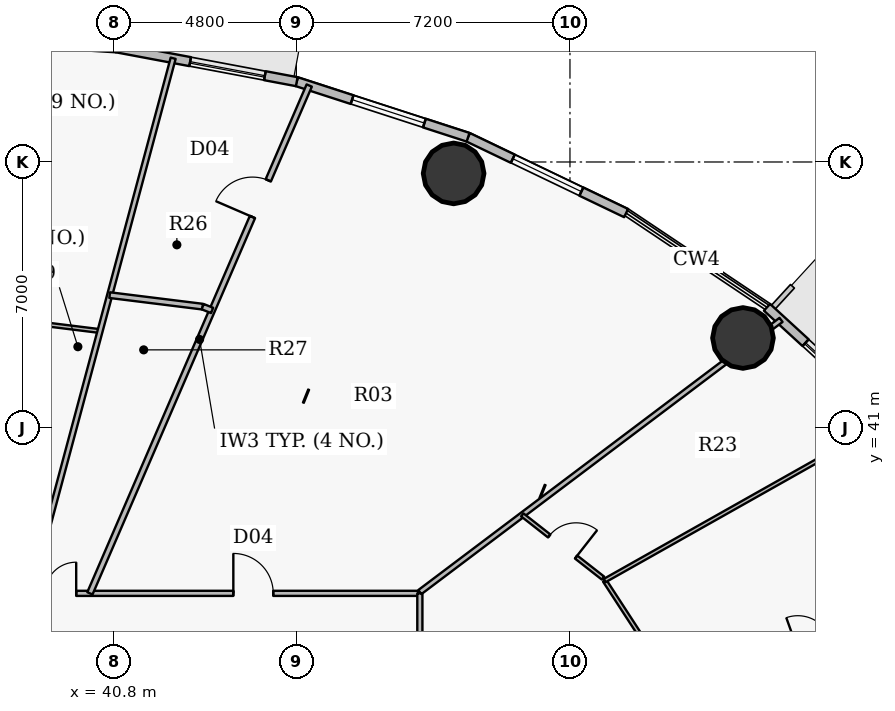
"""IFC4 building model, lengths in metres.
Left out: names, types, materials, properties, quantities, classifications, styles, units other than length and angle.
Written with IfcOpenShell. Run it as: python <this file> out.ifc"""

import sys

from ifc_helpers import new_model, si_unit, direction, frame, frame_2d, origin, origin_2d, place, context, subcontext, project, spatial, rectangle, hollow_circle, extrude, source, transform, mapped, element, fill, save


model = new_model("IFC4")
c1 = context("Model", 3, precision=1e-05, world=origin(), true_north=direction((0.0, 1.0)))
c2 = subcontext(c1, "Body", "Model", "MODEL_VIEW")
j1 = project(units=[si_unit("LENGTHUNIT", "METRE"), si_unit("PLANEANGLEUNIT", "RADIAN")], contexts=[c1])
p1 = place(None, origin())
s1 = spatial("IfcSite", under=j1, at=p1, CompositionType="ELEMENT")
p2 = place(p1, origin())
s2 = spatial("IfcBuilding", under=s1, at=p2, CompositionType="ELEMENT")
p3 = place(p2, frame((0.0, 0.0, 74.4)))
s3 = spatial("IfcBuildingStorey", under=s2, at=p3, CompositionType="ELEMENT", Elevation=74.4)
for number, where, z_axis, x_axis in (
    (1, (57.353, 43.369, 0.0), (0.0, 0.0, 1.0), (1.0, 0.0, 0.0)),
    (2, (49.738, 47.699, 0.0), (0.0, 0.0, 1.0), (1.0, 0.0, 0.0)),
):
    element("IfcColumn", number, at=place(p3, frame(where, z_axis=z_axis, x_axis=x_axis)), inside=s3, PredefinedType="COLUMN", context=c2, shape_type="SweptSolid", body=[
        extrude(hollow_circle(Radius=0.8, WallThickness=0.045, at=origin_2d()), origin(), (0.0, 0.0, 1.0), 4.2),
    ])
p4 = place(p3, frame((57.985, 44.176, 0.0), z_axis=(0.0, 0.0, 1.0), x_axis=(0.737116376281, -0.67576582321, 0.0)))
e3 = element("IfcWall", 3, at=p4, inside=s3, PredefinedType="SOLIDWALL", context=c2, shape_type="SweptSolid", body=[
    extrude(rectangle(XDim=4.294, YDim=0.24, at=frame_2d((2.147, 0.0))), origin(), (0.0, 0.0, 1.0), 3.95),
])
p5 = place(p4, frame((1.378, 0.0, 0.9)))
e4 = element("IfcOpeningElement", 4, at=p5, cuts=e3, PredefinedType="OPENING", context=c2, shape_type="SweptSolid", body=[
    extrude(rectangle(XDim=2.0, YDim=1.75, at=origin_2d()), frame((1.0, 0.13, 0.875), z_axis=(0.0, -1.0, 0.0), x_axis=(1.0, 0.0, 0.0)), (0.0, 0.0, 1.0), 0.26),
])
p6 = place(p3, frame((50.118, 48.651, 0.0), z_axis=(0.0, 0.0, 1.0), x_axis=(0.901601503137, -0.432567601123, 0.0)))
e5 = element("IfcWall", 5, at=p6, inside=s3, PredefinedType="SOLIDWALL", context=c2, shape_type="SweptSolid", body=[
    extrude(rectangle(XDim=4.613, YDim=0.24, at=frame_2d((2.306, 0.0))), origin(), (0.0, 0.0, 1.0), 3.95),
])
p7 = place(p6, frame((1.306, 0.0, 0.9)))
e6 = element("IfcOpeningElement", 6, at=p7, cuts=e5, PredefinedType="OPENING", context=c2, shape_type="SweptSolid", body=[
    extrude(rectangle(XDim=2.0, YDim=1.75, at=origin_2d()), frame((1.0, 0.13, 0.875), z_axis=(0.0, -1.0, 0.0), x_axis=(1.0, 0.0, 0.0)), (0.0, 0.0, 1.0), 0.26),
])
p8 = place(p3, frame((45.611, 50.113, 0.0), z_axis=(0.0, 0.0, 1.0), x_axis=(0.951207699013, -0.308551313946, 0.0)))
e7 = element("IfcWall", 7, at=p8, inside=s3, PredefinedType="SOLIDWALL", context=c2, shape_type="SweptSolid", body=[
    extrude(rectangle(XDim=4.739, YDim=0.24, at=frame_2d((2.369, 0.0))), origin(), (0.0, 0.0, 1.0), 3.95),
])
p9 = place(p8, frame((1.531, 0.0, 0.9)))
e8 = element("IfcOpeningElement", 8, at=p9, cuts=e7, PredefinedType="OPENING", context=c2, shape_type="SweptSolid", body=[
    extrude(rectangle(XDim=2.0, YDim=1.75, at=origin_2d()), frame((1.0, 0.13, 0.875), z_axis=(0.0, -1.0, 0.0), x_axis=(1.0, 0.0, 0.0)), (0.0, 0.0, 1.0), 0.26),
])
p10 = place(p3, frame((40.865, 51.005, 0.0), z_axis=(0.0, 0.0, 1.0), x_axis=(0.982791952378, -0.184715939598, 0.0)))
e9 = element("IfcWall", 9, at=p10, inside=s3, PredefinedType="SOLIDWALL", context=c2, shape_type="SweptSolid", body=[
    extrude(rectangle(XDim=4.828, YDim=0.24, at=frame_2d((2.414, 0.0))), origin(), (0.0, 0.0, 1.0), 3.95),
])
p11 = place(p10, frame((1.974, 0.0, 0.9)))
e10 = element("IfcOpeningElement", 10, at=p11, cuts=e9, PredefinedType="OPENING", context=c2, shape_type="SweptSolid", body=[
    extrude(rectangle(XDim=2.0, YDim=1.75, at=origin_2d()), frame((1.0, 0.13, 0.875), z_axis=(0.0, -1.0, 0.0), x_axis=(1.0, 0.0, 0.0)), (0.0, 0.0, 1.0), 0.26),
])
p12 = place(p3, frame((36.0, 51.305, 0.0), z_axis=(0.0, 0.0, 1.0), x_axis=(0.998106954071, -0.061502099433, 0.0)))
e11 = element("IfcWall", 11, at=p12, inside=s3, PredefinedType="SOLIDWALL", context=c2, shape_type="SweptSolid", body=[
    extrude(rectangle(XDim=4.875, YDim=0.24, at=frame_2d((2.438, 0.0))), origin(), (0.0, 0.0, 1.0), 3.95),
])
p13 = place(p12, frame((1.437, 0.0, 0.9)))
e12 = element("IfcOpeningElement", 12, at=p13, cuts=e11, PredefinedType="OPENING", context=c2, shape_type="SweptSolid", body=[
    extrude(rectangle(XDim=2.0, YDim=1.75, at=origin_2d()), frame((1.0, 0.13, 0.875), z_axis=(0.0, -1.0, 0.0), x_axis=(1.0, 0.0, 0.0)), (0.0, 0.0, 1.0), 0.26),
])
p14 = place(p3, frame((36.0, 44.101, 0.0), z_axis=(0.0, 0.0, 1.0), x_axis=(0.992395933878, -0.123086597249, 0.0)))
e13 = element("IfcWall", 13, at=p14, inside=s3, PredefinedType="PARTITIONING", context=c2, shape_type="SweptSolid", body=[
    extrude(rectangle(XDim=4.469, YDim=0.1, at=frame_2d((2.234, 0.0))), origin(), (0.0, 0.0, 1.0), 3.285),
])
p15 = place(p3, frame((38.586, 36.65, 0.0), z_axis=(0.0, 0.0, 1.0), x_axis=(1.0, 0.0, 0.0)))
e14 = element("IfcWall", 14, at=p15, inside=s3, PredefinedType="PARTITIONING", context=c2, shape_type="SweptSolid", body=[
    extrude(rectangle(XDim=10.22, YDim=0.135, at=frame_2d((5.11, 0.0))), origin(), (0.0, 0.0, 1.0), 3.285),
])
p16 = place(p15, frame((5.356, 0.0, 0.0)))
e15 = element("IfcOpeningElement", 15, at=p16, cuts=e14, PredefinedType="OPENING", context=c2, shape_type="SweptSolid", body=[
    extrude(rectangle(XDim=1.05, YDim=2.15, at=origin_2d()), frame((0.525, 0.078, 1.075), z_axis=(0.0, -1.0, 0.0), x_axis=(1.0, 0.0, 0.0)), (0.0, 0.0, 1.0), 0.155),
])
p17 = place(p15, frame((0.401, 0.0, 0.0)))
e16 = element("IfcOpeningElement", 16, at=p17, cuts=e14, PredefinedType="OPENING", context=c2, shape_type="SweptSolid", body=[
    extrude(rectangle(XDim=0.82, YDim=2.1, at=origin_2d()), frame((0.41, 0.078, 1.05), z_axis=(0.0, -1.0, 0.0), x_axis=(1.0, 0.0, 0.0)), (0.0, 0.0, 1.0), 0.155),
])
p18 = place(p3, frame((38.788, 37.404, 0.0), z_axis=(0.0, 0.0, 1.0), x_axis=(0.258823359021, 0.965924670368, 0.0)))
e17 = element("IfcWall", 17, at=p18, inside=s3, PredefinedType="PARTITIONING", context=c2, shape_type="SweptSolid", body=[
    extrude(rectangle(XDim=13.796, YDim=0.135, at=frame_2d((6.898, 0.0))), origin(), (0.0, 0.0, 1.0), 3.335),
])
p19 = place(p3, frame((40.168, 36.65, 0.0), z_axis=(0.0, 0.0, 1.0), x_axis=(0.396494814434, 0.918036961199, 0.0)))
e18 = element("IfcWall", 18, at=p19, inside=s3, PredefinedType="PARTITIONING", context=c2, shape_type="SweptSolid", body=[
    extrude(rectangle(XDim=14.555, YDim=0.15, at=frame_2d((7.277, 0.0))), origin(), (0.0, 0.0, 1.0), 3.335),
])
p20 = place(p19, frame((10.787, 0.0, 0.0)))
e19 = element("IfcOpeningElement", 19, at=p20, cuts=e18, PredefinedType="OPENING", context=c2, shape_type="SweptSolid", body=[
    extrude(rectangle(XDim=1.05, YDim=2.15, at=origin_2d()), frame((0.525, 0.085, 1.075), z_axis=(0.0, -1.0, 0.0), x_axis=(1.0, 0.0, 0.0)), (0.0, 0.0, 1.0), 0.17),
])
p21 = place(p3, frame((40.688, 44.497, 0.0), z_axis=(0.0, 0.0, 1.0), x_axis=(0.992393246318, -0.123108263989, 0.0)))
e20 = element("IfcWall", 20, at=p21, inside=s3, PredefinedType="PARTITIONING", context=c2, shape_type="SweptSolid", body=[
    extrude(rectangle(XDim=2.465, YDim=0.15, at=frame_2d((1.232, 0.0))), origin(), (0.0, 0.0, 1.0), 3.95),
])
p22 = place(p3, frame((43.135, 44.193, 0.0), z_axis=(0.0, 0.0, 1.0), x_axis=(0.928853768355, -0.370446591309, 0.0)))
e21 = element("IfcWall", 21, at=p22, inside=s3, PredefinedType="PARTITIONING", context=c2, shape_type="SweptSolid", body=[
    extrude(rectangle(XDim=0.268, YDim=0.15, at=frame_2d((0.134, 0.0))), origin(), (0.0, 0.0, 1.0), 3.95),
])
p23 = place(p3, frame((48.85, 27.538, 0.0), z_axis=(0.0, 0.0, 1.0), x_axis=(0.0, 1.0, 0.0)))
e22 = element("IfcWall", 22, at=p23, inside=s3, PredefinedType="PARTITIONING", context=c2, shape_type="SweptSolid", body=[
    extrude(rectangle(XDim=9.112, YDim=0.135, at=frame_2d((4.556, 0.0))), origin(), (0.0, 0.0, 1.0), 3.285),
])
p24 = place(p23, frame((4.056, 0.0, 0.0)))
e23 = element("IfcOpeningElement", 23, at=p24, cuts=e22, PredefinedType="OPENING", context=c2, shape_type="SweptSolid", body=[
    extrude(rectangle(XDim=1.0, YDim=2.15, at=origin_2d()), frame((0.5, 0.078, 1.075), z_axis=(0.0, -1.0, 0.0), x_axis=(1.0, 0.0, 0.0)), (0.0, 0.0, 1.0), 0.155),
])
p25 = place(p3, frame((48.85, 36.683, 0.0), z_axis=(0.0, 0.0, 1.0), x_axis=(0.798631551047, 0.601820276888, 0.0)))
e24 = element("IfcWall", 24, at=p25, inside=s3, PredefinedType="PARTITIONING", context=c2, shape_type="SweptSolid", body=[
    extrude(rectangle(XDim=11.9, YDim=0.135, at=frame_2d((5.95, 0.0))), origin(), (0.0, 0.0, 1.0), 3.285),
])
p26 = place(p3, frame((51.545, 38.714, 0.0), z_axis=(0.0, 0.0, 1.0), x_axis=(0.787378908715, -0.616469345637, 0.0)))
e25 = element("IfcWall", 25, at=p26, inside=s3, PredefinedType="PARTITIONING", context=c2, shape_type="SweptSolid", body=[
    extrude(rectangle(XDim=2.697, YDim=0.1, at=frame_2d((1.349, 0.0))), origin(), (0.0, 0.0, 1.0), 3.285),
])
p27 = place(p26, frame((0.898, 0.0, 0.0)))
e26 = element("IfcOpeningElement", 26, at=p27, cuts=e25, PredefinedType="OPENING", context=c2, shape_type="SweptSolid", body=[
    extrude(rectangle(XDim=0.9, YDim=2.1, at=origin_2d()), frame((0.45, 0.06, 1.05), z_axis=(0.0, -1.0, 0.0), x_axis=(1.0, 0.0, 0.0)), (0.0, 0.0, 1.0), 0.12),
])
p28 = place(p3, frame((53.712, 36.986, 0.0), z_axis=(0.0, 0.0, 1.0), x_axis=(0.545414193743, -0.838166664372, 0.0)))
e27 = element("IfcWall", 27, at=p28, inside=s3, PredefinedType="PARTITIONING", context=c2, shape_type="SweptSolid", body=[
    extrude(rectangle(XDim=3.526, YDim=0.1, at=frame_2d((1.763, 0.0))), origin(), (0.0, 0.0, 1.0), 3.95),
])
p29 = place(p3, frame((53.712, 36.986, 0.0), z_axis=(0.0, 0.0, 1.0), x_axis=(0.871096144904, 0.491112519016, 0.0)))
e28 = element("IfcWall", 28, at=p29, inside=s3, PredefinedType="PARTITIONING", context=c2, shape_type="SweptSolid", body=[
    extrude(rectangle(XDim=8.603, YDim=0.1, at=frame_2d((4.302, 0.0))), origin(), (0.0, 0.0, 1.0), 3.335),
])
p30 = place(p3, frame((55.635, 34.03, 0.0), z_axis=(0.0, 0.0, 1.0), x_axis=(0.941479076549, 0.337071429255, 0.0)))
e29 = element("IfcWall", 29, at=p30, inside=s3, PredefinedType="PARTITIONING", context=c2, shape_type="SweptSolid", body=[
    extrude(rectangle(XDim=9.089, YDim=0.1, at=frame_2d((4.544, 0.0))), origin(), (0.0, 0.0, 1.0), 3.335),
])
p31 = place(p30, frame((3.357, 0.0, 0.0)))
e30 = element("IfcOpeningElement", 30, at=p31, cuts=e29, PredefinedType="OPENING", context=c2, shape_type="SweptSolid", body=[
    extrude(rectangle(XDim=0.9, YDim=2.1, at=origin_2d()), frame((0.45, 0.06, 1.05), z_axis=(0.0, -1.0, 0.0), x_axis=(1.0, 0.0, 0.0)), (0.0, 0.0, 1.0), 0.12),
])
m1 = source(origin(), c2, "Body", "SweptSolid", [
    extrude(rectangle(XDim=2.0, YDim=1.75, at=origin_2d()), frame((1.0, 0.03, 0.875), z_axis=(0.0, -1.0, 0.0), x_axis=(1.0, 0.0, 0.0)), (0.0, 0.0, 1.0), 0.06),
])
p32 = place(p5, origin())
e31 = element("IfcWindow", 31, at=p32, inside=s3, PartitioningType="DOUBLE_PANEL_VERTICAL", PredefinedType="WINDOW", context=c2, shape_type="MappedRepresentation", body=[
    mapped(m1, transform((0.0, 0.0, 0.0), x_axis=(1.0, 0.0, 0.0), y_axis=(0.0, 1.0, 0.0), z_axis=(0.0, 0.0, 1.0), scale=1.0)),
])
fill(e4, e31)
p33 = place(p7, origin())
e32 = element("IfcWindow", 32, at=p33, inside=s3, PartitioningType="DOUBLE_PANEL_VERTICAL", PredefinedType="WINDOW", context=c2, shape_type="MappedRepresentation", body=[
    mapped(m1, transform((0.0, 0.0, 0.0), x_axis=(1.0, 0.0, 0.0), y_axis=(0.0, 1.0, 0.0), z_axis=(0.0, 0.0, 1.0), scale=1.0)),
])
fill(e6, e32)
p34 = place(p9, origin())
e33 = element("IfcWindow", 33, at=p34, inside=s3, PartitioningType="DOUBLE_PANEL_VERTICAL", PredefinedType="WINDOW", context=c2, shape_type="MappedRepresentation", body=[
    mapped(m1, transform((0.0, 0.0, 0.0), x_axis=(1.0, 0.0, 0.0), y_axis=(0.0, 1.0, 0.0), z_axis=(0.0, 0.0, 1.0), scale=1.0)),
])
fill(e8, e33)
p35 = place(p11, origin())
e34 = element("IfcWindow", 34, at=p35, inside=s3, PartitioningType="DOUBLE_PANEL_VERTICAL", PredefinedType="WINDOW", context=c2, shape_type="MappedRepresentation", body=[
    mapped(m1, transform((0.0, 0.0, 0.0), x_axis=(1.0, 0.0, 0.0), y_axis=(0.0, 1.0, 0.0), z_axis=(0.0, 0.0, 1.0), scale=1.0)),
])
fill(e10, e34)
m2 = source(origin(), c2, "Body", "SweptSolid", [
    extrude(rectangle(XDim=0.9, YDim=2.1, at=origin_2d()), frame((0.45, 0.025, 1.05), z_axis=(0.0, -1.0, 0.0), x_axis=(1.0, 0.0, 0.0)), (0.0, 0.0, 1.0), 0.05),
])
p36 = place(p27, origin())
e35 = element("IfcDoor", 35, at=p36, inside=s3, OperationType="SINGLE_SWING_RIGHT", PredefinedType="DOOR", context=c2, shape_type="MappedRepresentation", body=[
    mapped(m2, transform((0.0, 0.0, 0.0), x_axis=(1.0, 0.0, 0.0), y_axis=(0.0, 1.0, 0.0), z_axis=(0.0, 0.0, 1.0), scale=1.0)),
])
fill(e26, e35)
m3 = source(origin(), c2, "Body", "SweptSolid", [
    extrude(rectangle(XDim=1.05, YDim=2.15, at=origin_2d()), frame((0.525, 0.025, 1.075), z_axis=(0.0, -1.0, 0.0), x_axis=(1.0, 0.0, 0.0)), (0.0, 0.0, 1.0), 0.05),
])
p37 = place(p16, origin())
e36 = element("IfcDoor", 36, at=p37, inside=s3, OperationType="SINGLE_SWING_LEFT", PredefinedType="DOOR", context=c2, shape_type="MappedRepresentation", body=[
    mapped(m3, transform((0.0, 0.0, 0.0), x_axis=(1.0, 0.0, 0.0), y_axis=(0.0, 1.0, 0.0), z_axis=(0.0, 0.0, 1.0), scale=1.0)),
])
fill(e15, e36)
m4 = source(origin(), c2, "Body", "SweptSolid", [
    extrude(rectangle(XDim=0.82, YDim=2.1, at=origin_2d()), frame((0.41, 0.025, 1.05), z_axis=(0.0, -1.0, 0.0), x_axis=(1.0, 0.0, 0.0)), (0.0, 0.0, 1.0), 0.05),
])
p38 = place(p17, origin())
e37 = element("IfcDoor", 37, at=p38, inside=s3, OperationType="SINGLE_SWING_RIGHT", PredefinedType="DOOR", context=c2, shape_type="MappedRepresentation", body=[
    mapped(m4, transform((0.0, 0.0, 0.0), x_axis=(1.0, 0.0, 0.0), y_axis=(0.0, 1.0, 0.0), z_axis=(0.0, 0.0, 1.0), scale=1.0)),
])
fill(e16, e37)
p39 = place(p20, origin())
e38 = element("IfcDoor", 38, at=p39, inside=s3, OperationType="SINGLE_SWING_LEFT", PredefinedType="DOOR", context=c2, shape_type="MappedRepresentation", body=[
    mapped(m3, transform((0.0, 0.0, 0.0), x_axis=(1.0, 0.0, 0.0), y_axis=(0.0, 1.0, 0.0), z_axis=(0.0, 0.0, 1.0), scale=1.0)),
])
fill(e19, e38)
save(model, sys.argv[1])
